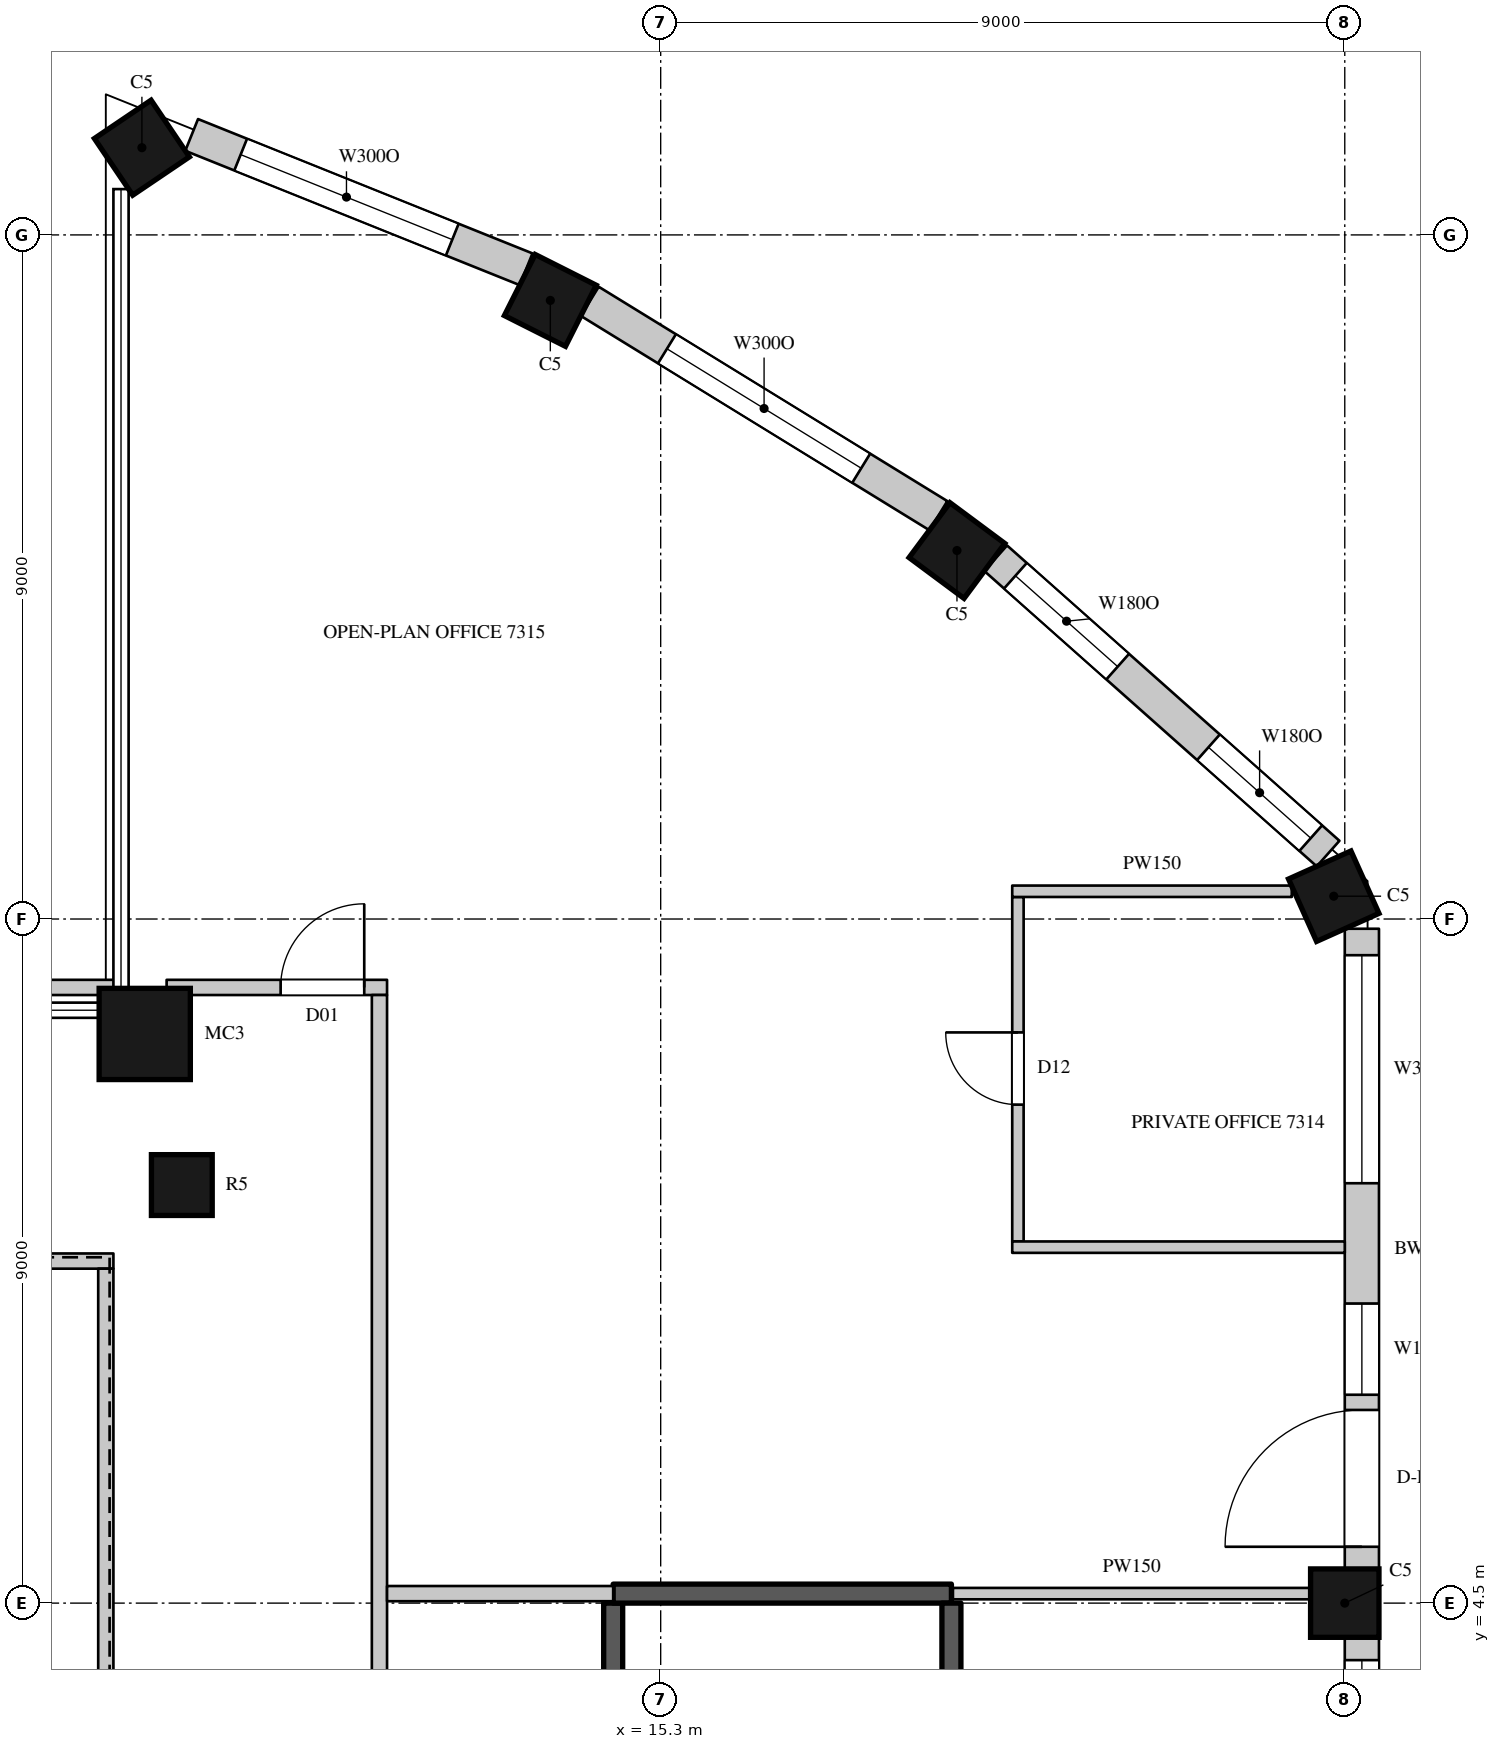
"""IFC4 building model, lengths in metres.
Left out: names, types, materials, properties, quantities, classifications, styles, units other than length and angle.
Written with IfcOpenShell. Run it as: python <this file> out.ifc"""

import sys

from ifc_helpers import new_model, si_unit, direction, frame, frame_2d, origin, origin_2d, place, context, subcontext, project, spatial, rectangle, circle, extrude, element, fill, save


model = new_model("IFC4")
c1 = context("Model", 3, precision=1e-05, world=origin(), true_north=direction((0.0, 1.0)))
c2 = subcontext(c1, "Body", "Model", "MODEL_VIEW")
j1 = project(units=[si_unit("LENGTHUNIT", "METRE"), si_unit("PLANEANGLEUNIT", "RADIAN")], contexts=[c1])
p1 = place(None, origin())
s1 = spatial("IfcSite", under=j1, at=p1, CompositionType="ELEMENT")
p2 = place(p1, origin())
s2 = spatial("IfcBuilding", under=s1, at=p2, CompositionType="ELEMENT")
p3 = place(p2, frame((0.0, 0.0, 321.3)))
s3 = spatial("IfcBuildingStorey", under=s2, at=p3, CompositionType="ELEMENT", Elevation=321.3)
p4 = place(p3, frame((8.475, 23.647, 0.0), z_axis=(0.0, 0.0, 1.0), x_axis=(-0.828469606019, -0.560034027451, 0.0)))
e1 = element("IfcColumn", 1, at=p4, inside=s3, PredefinedType="COLUMN", context=c2, shape_type="SweptSolid", body=[
    extrude(rectangle(XDim=0.9, YDim=0.9, at=origin_2d()), origin(), (0.0, 0.0, 1.0), 4.1),
])
p5 = place(p3, frame((8.512, 11.988, 0.0), z_axis=(0.0, 0.0, 1.0), x_axis=(1.0, 0.0, 0.0)))
e2 = element("IfcColumn", 2, at=p5, inside=s3, PredefinedType="COLUMN", context=c2, shape_type="SweptSolid", body=[
    extrude(circle(Radius=0.6, at=origin_2d()), origin(), (0.0, 0.0, 1.0), 4.1),
])
for number, where, z_axis, x_axis in (
    (3, (24.3, 4.5, 0.0), (0.0, 0.0, 1.0), (0.0, 1.0, 0.0)),
    (4, (24.155, 13.8, 0.0), (0.0, 0.0, 1.0), (-0.41, 0.912, 0.0)),
    (5, (19.198, 18.348, 0.0), (0.0, 0.0, 1.0), (-0.803, 0.596, 0.0)),
    (6, (13.848, 21.638, 0.0), (0.0, 0.0, 1.0), (-0.893, 0.45, 0.0)),
):
    element("IfcColumn", number, at=place(p3, frame(where, z_axis=z_axis, x_axis=x_axis)), inside=s3, PredefinedType="COLUMN", context=c2, shape_type="SweptSolid", body=[
        extrude(rectangle(XDim=0.9, YDim=0.9, at=origin_2d()), origin(), (0.0, 0.0, 1.0), 4.1),
    ])
p6 = place(p3, frame((9.0, 10.0, 0.0), z_axis=(0.0, 0.0, 1.0), x_axis=(1.0, 0.0, 0.0)))
e7 = element("IfcColumn", 7, at=p6, inside=s3, PredefinedType="COLUMN", context=c2, shape_type="SweptSolid", body=[
    extrude(circle(Radius=0.4, at=origin_2d()), origin(), (0.0, 0.0, 1.0), 4.1),
])
p7 = place(p3, frame((24.525, -4.05, 0.0), z_axis=(0.0, 0.0, 1.0), x_axis=(0.0, 1.0, 0.0)))
e8 = element("IfcWall", 8, at=p7, inside=s3, PredefinedType="SOLIDWALL", context=c2, shape_type="SweptSolid", body=[
    extrude(rectangle(XDim=8.1, YDim=0.45, at=frame_2d((4.05, 0.0))), origin(), (0.0, 0.0, 1.0), 3.8),
])
p8 = place(p7, frame((0.3, 0.0, 1.05)))
e9 = element("IfcOpeningElement", 9, at=p8, cuts=e8, PredefinedType="OPENING", context=c2, shape_type="SweptSolid", body=[
    extrude(rectangle(XDim=3.0, YDim=2.4, at=frame_2d((1.5, 1.2))), frame((0.0, 0.235, 0.0), z_axis=(0.0, -1.0, 0.0), x_axis=(1.0, 0.0, 0.0)), (0.0, 0.0, 1.0), 0.47),
])
p9 = place(p7, frame((4.8, 0.0, 1.05)))
e10 = element("IfcOpeningElement", 10, at=p9, cuts=e8, PredefinedType="OPENING", context=c2, shape_type="SweptSolid", body=[
    extrude(rectangle(XDim=3.0, YDim=2.4, at=frame_2d((1.5, 1.2))), frame((0.0, 0.235, 0.0), z_axis=(0.0, -1.0, 0.0), x_axis=(1.0, 0.0, 0.0)), (0.0, 0.0, 1.0), 0.47),
])
p10 = place(p3, frame((24.525, 4.95, 0.0), z_axis=(0.0, 0.0, 1.0), x_axis=(0.0, 1.0, 0.0)))
e11 = element("IfcWall", 11, at=p10, inside=s3, PredefinedType="SOLIDWALL", context=c2, shape_type="SweptSolid", body=[
    extrude(rectangle(XDim=8.422, YDim=0.45, at=frame_2d((4.211, 0.0))), origin(), (0.0, 0.0, 1.0), 3.8),
])
p11 = place(p10, frame((0.291, 0.0, 0.0)))
e12 = element("IfcOpeningElement", 12, at=p11, cuts=e11, PredefinedType="OPENING", context=c2, shape_type="SweptSolid", body=[
    extrude(rectangle(XDim=1.8, YDim=2.4, at=frame_2d((0.9, 1.2))), frame((0.0, 0.235, 0.0), z_axis=(0.0, -1.0, 0.0), x_axis=(1.0, 0.0, 0.0)), (0.0, 0.0, 1.0), 0.47),
])
p12 = place(p10, frame((2.291, 0.0, 1.05)))
e13 = element("IfcOpeningElement", 13, at=p12, cuts=e11, PredefinedType="OPENING", context=c2, shape_type="SweptSolid", body=[
    extrude(rectangle(XDim=1.2, YDim=2.4, at=frame_2d((0.6, 1.2))), frame((0.0, 0.235, 0.0), z_axis=(0.0, -1.0, 0.0), x_axis=(1.0, 0.0, 0.0)), (0.0, 0.0, 1.0), 0.47),
])
p13 = place(p10, frame((5.074, 0.0, 1.05)))
e14 = element("IfcOpeningElement", 14, at=p13, cuts=e11, PredefinedType="OPENING", context=c2, shape_type="SweptSolid", body=[
    extrude(rectangle(XDim=3.0, YDim=2.4, at=frame_2d((1.5, 1.2))), frame((0.0, 0.235, 0.0), z_axis=(0.0, -1.0, 0.0), x_axis=(1.0, 0.0, 0.0)), (0.0, 0.0, 1.0), 0.47),
])
p14 = place(p3, frame((24.081, 14.361, 0.0), z_axis=(0.0, 0.0, 1.0), x_axis=(-0.747570482973, 0.664182484704, 0.0)))
e15 = element("IfcWall", 15, at=p14, inside=s3, PredefinedType="SOLIDWALL", context=c2, shape_type="SweptSolid", body=[
    extrude(rectangle(XDim=5.85, YDim=0.45, at=frame_2d((2.925, 0.0))), origin(), (0.0, 0.0, 1.0), 3.8),
])
p15 = place(p14, frame((0.305, 0.0, 1.05)))
e16 = element("IfcOpeningElement", 16, at=p15, cuts=e15, PredefinedType="OPENING", context=c2, shape_type="SweptSolid", body=[
    extrude(rectangle(XDim=1.8, YDim=2.4, at=frame_2d((0.9, 1.2))), frame((0.0, 0.235, 0.0), z_axis=(0.0, -1.0, 0.0), x_axis=(1.0, 0.0, 0.0)), (0.0, 0.0, 1.0), 0.47),
])
p16 = place(p14, frame((3.703, 0.0, 1.05)))
e17 = element("IfcOpeningElement", 17, at=p16, cuts=e15, PredefinedType="OPENING", context=c2, shape_type="SweptSolid", body=[
    extrude(rectangle(XDim=1.8, YDim=2.4, at=frame_2d((0.9, 1.2))), frame((0.0, 0.235, 0.0), z_axis=(0.0, -1.0, 0.0), x_axis=(1.0, 0.0, 0.0)), (0.0, 0.0, 1.0), 0.47),
])
p17 = place(p3, frame((18.953, 18.806, 0.0), z_axis=(0.0, 0.0, 1.0), x_axis=(-0.851860664503, 0.523768468193, 0.0)))
e18 = element("IfcWall", 18, at=p17, inside=s3, PredefinedType="SOLIDWALL", context=c2, shape_type="SweptSolid", body=[
    extrude(rectangle(XDim=5.384, YDim=0.45, at=frame_2d((2.692, 0.0))), origin(), (0.0, 0.0, 1.0), 3.8),
])
p18 = place(p17, frame((1.192, 0.0, 1.05)))
e19 = element("IfcOpeningElement", 19, at=p18, cuts=e18, PredefinedType="OPENING", context=c2, shape_type="SweptSolid", body=[
    extrude(rectangle(XDim=3.0, YDim=2.4, at=frame_2d((1.5, 1.2))), frame((0.0, 0.235, 0.0), z_axis=(0.0, -1.0, 0.0), x_axis=(1.0, 0.0, 0.0)), (0.0, 0.0, 1.0), 0.47),
])
p19 = place(p3, frame((13.529, 22.048, 0.0), z_axis=(0.0, 0.0, 1.0), x_axis=(-0.927957332619, 0.372686448424, 0.0)))
e20 = element("IfcWall", 20, at=p19, inside=s3, PredefinedType="SOLIDWALL", context=c2, shape_type="SweptSolid", body=[
    extrude(rectangle(XDim=4.741, YDim=0.45, at=frame_2d((2.371, 0.0))), origin(), (0.0, 0.0, 1.0), 3.8),
])
p20 = place(p19, frame((1.047, 0.0, 1.05)))
e21 = element("IfcOpeningElement", 21, at=p20, cuts=e20, PredefinedType="OPENING", context=c2, shape_type="SweptSolid", body=[
    extrude(rectangle(XDim=3.0, YDim=2.4, at=frame_2d((1.5, 1.2))), frame((0.0, 0.235, 0.0), z_axis=(0.0, -1.0, 0.0), x_axis=(1.0, 0.0, 0.0)), (0.0, 0.0, 1.0), 0.47),
])
p21 = place(p3, frame((6.75, 12.6, 0.0), z_axis=(0.0, 0.0, 1.0), x_axis=(1.0, 0.0, 0.0)))
e22 = element("IfcWall", 22, at=p21, inside=s3, PredefinedType="PARTITIONING", context=c2, shape_type="SweptSolid", body=[
    extrude(rectangle(XDim=1.48, YDim=0.2, at=frame_2d((0.74, 0.0))), origin(), (0.0, 0.0, 1.0), 3.8),
])
p22 = place(p3, frame((-6.1, 9.0, 0.0), z_axis=(0.0, 0.0, 1.0), x_axis=(1.0, 0.0, 0.0)))
e23 = element("IfcWall", 23, at=p22, inside=s3, PredefinedType="PARTITIONING", context=c2, shape_type="SweptSolid", body=[
    extrude(rectangle(XDim=14.2, YDim=0.2, at=frame_2d((7.1, 0.0))), origin(), (0.0, 0.0, 1.0), 3.8),
])
p23 = place(p3, frame((8.0, 0.02, 0.0), z_axis=(0.0, 0.0, 1.0), x_axis=(0.0, 1.0, 0.0)))
e24 = element("IfcWall", 24, at=p23, inside=s3, PredefinedType="PARTITIONING", context=c2, shape_type="SweptSolid", body=[
    extrude(rectangle(XDim=8.88, YDim=0.2, at=frame_2d((4.44, 0.0))), origin(), (0.0, 0.0, 1.0), 3.8),
])
p24 = place(p3, frame((8.8, 12.6, 0.0), z_axis=(0.0, 0.0, 1.0), x_axis=(1.0, 0.0, 0.0)))
e25 = element("IfcWall", 25, at=p24, inside=s3, PredefinedType="PARTITIONING", context=c2, shape_type="SweptSolid", body=[
    extrude(rectangle(XDim=2.9, YDim=0.2, at=frame_2d((1.45, 0.0))), origin(), (0.0, 0.0, 1.0), 3.8),
])
p25 = place(p24, frame((1.5, 0.0, 0.0)))
e26 = element("IfcOpeningElement", 26, at=p25, cuts=e25, PredefinedType="OPENING", context=c2, shape_type="SweptSolid", body=[
    extrude(rectangle(XDim=1.1, YDim=2.4, at=frame_2d((0.55, 1.2))), frame((0.0, 0.11, 0.0), z_axis=(0.0, -1.0, 0.0), x_axis=(1.0, 0.0, 0.0)), (0.0, 0.0, 1.0), 0.22),
])
p26 = place(p3, frame((11.6, -12.5, 0.0), z_axis=(0.0, 0.0, 1.0), x_axis=(0.0, 1.0, 0.0)))
e27 = element("IfcWall", 27, at=p26, inside=s3, PredefinedType="PARTITIONING", context=c2, shape_type="SweptSolid", body=[
    extrude(rectangle(XDim=25.0, YDim=0.2, at=frame_2d((12.5, 0.0))), origin(), (0.0, 0.0, 1.0), 3.8),
])
p27 = place(p26, frame((9.4, 0.0, 0.0)))
e28 = element("IfcOpeningElement", 28, at=p27, cuts=e27, PredefinedType="OPENING", context=c2, shape_type="SweptSolid", body=[
    extrude(rectangle(XDim=1.5, YDim=2.4, at=frame_2d((0.75, 1.2))), frame((0.0, 0.11, 0.0), z_axis=(0.0, -1.0, 0.0), x_axis=(1.0, 0.0, 0.0)), (0.0, 0.0, 1.0), 0.22),
])
p28 = place(p26, frame((5.5, 0.0, 0.0)))
e29 = element("IfcOpeningElement", 29, at=p28, cuts=e27, PredefinedType="OPENING", context=c2, shape_type="SweptSolid", body=[
    extrude(rectangle(XDim=1.1, YDim=2.4, at=frame_2d((0.55, 1.2))), frame((0.0, 0.11, 0.0), z_axis=(0.0, -1.0, 0.0), x_axis=(1.0, 0.0, 0.0)), (0.0, 0.0, 1.0), 0.22),
])
p29 = place(p3, frame((11.7, 4.625, 0.0), z_axis=(0.0, 0.0, 1.0), x_axis=(1.0, 0.0, 0.0)))
e30 = element("IfcWall", 30, at=p29, inside=s3, PredefinedType="PARTITIONING", context=c2, shape_type="SweptSolid", body=[
    extrude(rectangle(XDim=2.975, YDim=0.2, at=frame_2d((1.488, 0.0))), origin(), (0.0, 0.0, 1.0), 3.8),
])
p30 = place(p3, frame((19.145, 4.625, 0.0), z_axis=(0.0, 0.0, 1.0), x_axis=(1.0, 0.0, 0.0)))
e31 = element("IfcWall", 31, at=p30, inside=s3, PredefinedType="PARTITIONING", context=c2, shape_type="SweptSolid", body=[
    extrude(rectangle(XDim=4.705, YDim=0.15, at=frame_2d((2.353, 0.0))), origin(), (0.0, 0.0, 1.0), 3.8),
])
p31 = place(p3, frame((20.0, 9.258, 0.0), z_axis=(0.0, 0.0, 1.0), x_axis=(0.0, 1.0, 0.0)))
e32 = element("IfcWall", 32, at=p31, inside=s3, PredefinedType="PARTITIONING", context=c2, shape_type="SweptSolid", body=[
    extrude(rectangle(XDim=4.532, YDim=0.15, at=frame_2d((2.266, 0.0))), origin(), (0.0, 0.0, 1.0), 3.8),
])
p32 = place(p31, frame((1.8, 0.0, 0.0)))
e33 = element("IfcOpeningElement", 33, at=p32, cuts=e32, PredefinedType="OPENING", context=c2, shape_type="SweptSolid", body=[
    extrude(rectangle(XDim=0.95, YDim=2.2, at=frame_2d((0.475, 1.1))), frame((0.0, 0.085, 0.0), z_axis=(0.0, -1.0, 0.0), x_axis=(1.0, 0.0, 0.0)), (0.0, 0.0, 1.0), 0.17),
])
p33 = place(p3, frame((19.925, 9.183, 0.0), z_axis=(0.0, 0.0, 1.0), x_axis=(1.0, 0.0, 0.0)))
e34 = element("IfcWall", 34, at=p33, inside=s3, PredefinedType="PARTITIONING", context=c2, shape_type="SweptSolid", body=[
    extrude(rectangle(XDim=4.375, YDim=0.15, at=frame_2d((2.188, 0.0))), origin(), (0.0, 0.0, 1.0), 3.15),
])
p34 = place(p3, frame((19.925, 13.865, 0.0), z_axis=(0.0, 0.0, 1.0), x_axis=(1.0, 0.0, 0.0)))
e35 = element("IfcWall", 35, at=p34, inside=s3, PredefinedType="PARTITIONING", context=c2, shape_type="SweptSolid", body=[
    extrude(rectangle(XDim=3.678, YDim=0.15, at=frame_2d((1.839, 0.0))), origin(), (0.0, 0.0, 1.0), 3.8),
])
p35 = place(p3, frame((14.675, -4.5, 0.0), z_axis=(0.0, 0.0, 1.0), x_axis=(0.0, 1.0, 0.0)))
e36 = element("IfcWall", 36, at=p35, inside=s3, PredefinedType="SHEAR", context=c2, shape_type="SweptSolid", body=[
    extrude(rectangle(XDim=9.0, YDim=0.25, at=frame_2d((4.5, 0.0))), origin(), (0.0, 0.0, 1.0), 3.8),
])
p36 = place(p35, frame((0.45, 0.0, 0.0)))
e37 = element("IfcOpeningElement", 37, at=p36, cuts=e36, PredefinedType="OPENING", context=c2, shape_type="SweptSolid", body=[
    extrude(rectangle(XDim=1.1, YDim=2.2, at=frame_2d((0.55, 1.1))), frame((0.0, 0.135, 0.0), z_axis=(0.0, -1.0, 0.0), x_axis=(1.0, 0.0, 0.0)), (0.0, 0.0, 1.0), 0.27),
])
p37 = place(p3, frame((14.675, 4.625, 0.0), z_axis=(0.0, 0.0, 1.0), x_axis=(1.0, 0.0, 0.0)))
e38 = element("IfcWall", 38, at=p37, inside=s3, PredefinedType="SHEAR", context=c2, shape_type="SweptSolid", body=[
    extrude(rectangle(XDim=4.45, YDim=0.25, at=frame_2d((2.225, 0.0))), origin(), (0.0, 0.0, 1.0), 3.8),
])
p38 = place(p3, frame((19.125, -4.5, 0.0), z_axis=(0.0, 0.0, 1.0), x_axis=(0.0, 1.0, 0.0)))
e39 = element("IfcWall", 39, at=p38, inside=s3, PredefinedType="SHEAR", context=c2, shape_type="SweptSolid", body=[
    extrude(rectangle(XDim=9.0, YDim=0.25, at=frame_2d((4.5, 0.0))), origin(), (0.0, 0.0, 1.0), 3.8),
])
p39 = place(p9, origin())
e40 = element("IfcWindow", 40, at=p39, inside=s3, PartitioningType="SINGLE_PANEL", PredefinedType="WINDOW", context=c2, shape_type="SweptSolid", body=[
    extrude(rectangle(XDim=3.0, YDim=2.4, at=frame_2d((1.5, 1.2))), frame((0.0, 0.135, 0.0), z_axis=(0.0, -1.0, 0.0), x_axis=(1.0, 0.0, 0.0)), (0.0, 0.0, 1.0), 0.06),
])
fill(e10, e40)
p40 = place(p11, origin())
e41 = element("IfcDoor", 41, at=p40, inside=s3, OperationType="SLIDING_TO_LEFT", PredefinedType="DOOR", context=c2, shape_type="SweptSolid", body=[
    extrude(rectangle(XDim=1.8, YDim=2.4, at=frame_2d((0.9, 1.2))), frame((0.0, 0.13, 0.0), z_axis=(0.0, -1.0, 0.0), x_axis=(1.0, 0.0, 0.0)), (0.0, 0.0, 1.0), 0.05),
])
fill(e12, e41)
p41 = place(p12, origin())
e42 = element("IfcWindow", 42, at=p41, inside=s3, PartitioningType="SINGLE_PANEL", PredefinedType="WINDOW", context=c2, shape_type="SweptSolid", body=[
    extrude(rectangle(XDim=1.2, YDim=2.4, at=frame_2d((0.6, 1.2))), frame((0.0, 0.135, 0.0), z_axis=(0.0, -1.0, 0.0), x_axis=(1.0, 0.0, 0.0)), (0.0, 0.0, 1.0), 0.06),
])
fill(e13, e42)
p42 = place(p13, origin())
e43 = element("IfcWindow", 43, at=p42, inside=s3, PartitioningType="SINGLE_PANEL", PredefinedType="WINDOW", context=c2, shape_type="SweptSolid", body=[
    extrude(rectangle(XDim=3.0, YDim=2.4, at=frame_2d((1.5, 1.2))), frame((0.0, 0.135, 0.0), z_axis=(0.0, -1.0, 0.0), x_axis=(1.0, 0.0, 0.0)), (0.0, 0.0, 1.0), 0.06),
])
fill(e14, e43)
p43 = place(p15, origin())
e44 = element("IfcWindow", 44, at=p43, inside=s3, PartitioningType="SINGLE_PANEL", PredefinedType="WINDOW", context=c2, shape_type="SweptSolid", body=[
    extrude(rectangle(XDim=1.8, YDim=2.4, at=frame_2d((0.9, 1.2))), frame((0.0, 0.135, 0.0), z_axis=(0.0, -1.0, 0.0), x_axis=(1.0, 0.0, 0.0)), (0.0, 0.0, 1.0), 0.06),
])
fill(e16, e44)
p44 = place(p16, origin())
e45 = element("IfcWindow", 45, at=p44, inside=s3, PartitioningType="SINGLE_PANEL", PredefinedType="WINDOW", context=c2, shape_type="SweptSolid", body=[
    extrude(rectangle(XDim=1.8, YDim=2.4, at=frame_2d((0.9, 1.2))), frame((0.0, 0.135, 0.0), z_axis=(0.0, -1.0, 0.0), x_axis=(1.0, 0.0, 0.0)), (0.0, 0.0, 1.0), 0.06),
])
fill(e17, e45)
p45 = place(p18, origin())
e46 = element("IfcWindow", 46, at=p45, inside=s3, PartitioningType="SINGLE_PANEL", PredefinedType="WINDOW", context=c2, shape_type="SweptSolid", body=[
    extrude(rectangle(XDim=3.0, YDim=2.4, at=frame_2d((1.5, 1.2))), frame((0.0, 0.135, 0.0), z_axis=(0.0, -1.0, 0.0), x_axis=(1.0, 0.0, 0.0)), (0.0, 0.0, 1.0), 0.06),
])
fill(e19, e46)
p46 = place(p20, origin())
e47 = element("IfcWindow", 47, at=p46, inside=s3, PartitioningType="SINGLE_PANEL", PredefinedType="WINDOW", context=c2, shape_type="SweptSolid", body=[
    extrude(rectangle(XDim=3.0, YDim=2.4, at=frame_2d((1.5, 1.2))), frame((0.0, 0.135, 0.0), z_axis=(0.0, -1.0, 0.0), x_axis=(1.0, 0.0, 0.0)), (0.0, 0.0, 1.0), 0.06),
])
fill(e21, e47)
p47 = place(p25, origin())
e48 = element("IfcDoor", 48, at=p47, inside=s3, OperationType="SINGLE_SWING_RIGHT", PredefinedType="DOOR", context=c2, shape_type="SweptSolid", body=[
    extrude(rectangle(XDim=1.1, YDim=2.4, at=frame_2d((0.55, 1.2))), frame((0.0, 0.025, 0.0), z_axis=(0.0, -1.0, 0.0), x_axis=(1.0, 0.0, 0.0)), (0.0, 0.0, 1.0), 0.05),
])
fill(e26, e48)
p48 = place(p32, origin())
e49 = element("IfcDoor", 49, at=p48, inside=s3, OperationType="SINGLE_SWING_RIGHT", PredefinedType="DOOR", context=c2, shape_type="SweptSolid", body=[
    extrude(rectangle(XDim=0.95, YDim=2.2, at=frame_2d((0.475, 1.1))), frame((0.0, 0.025, 0.0), z_axis=(0.0, -1.0, 0.0), x_axis=(1.0, 0.0, 0.0)), (0.0, 0.0, 1.0), 0.05),
])
fill(e33, e49)
save(model, sys.argv[1])
